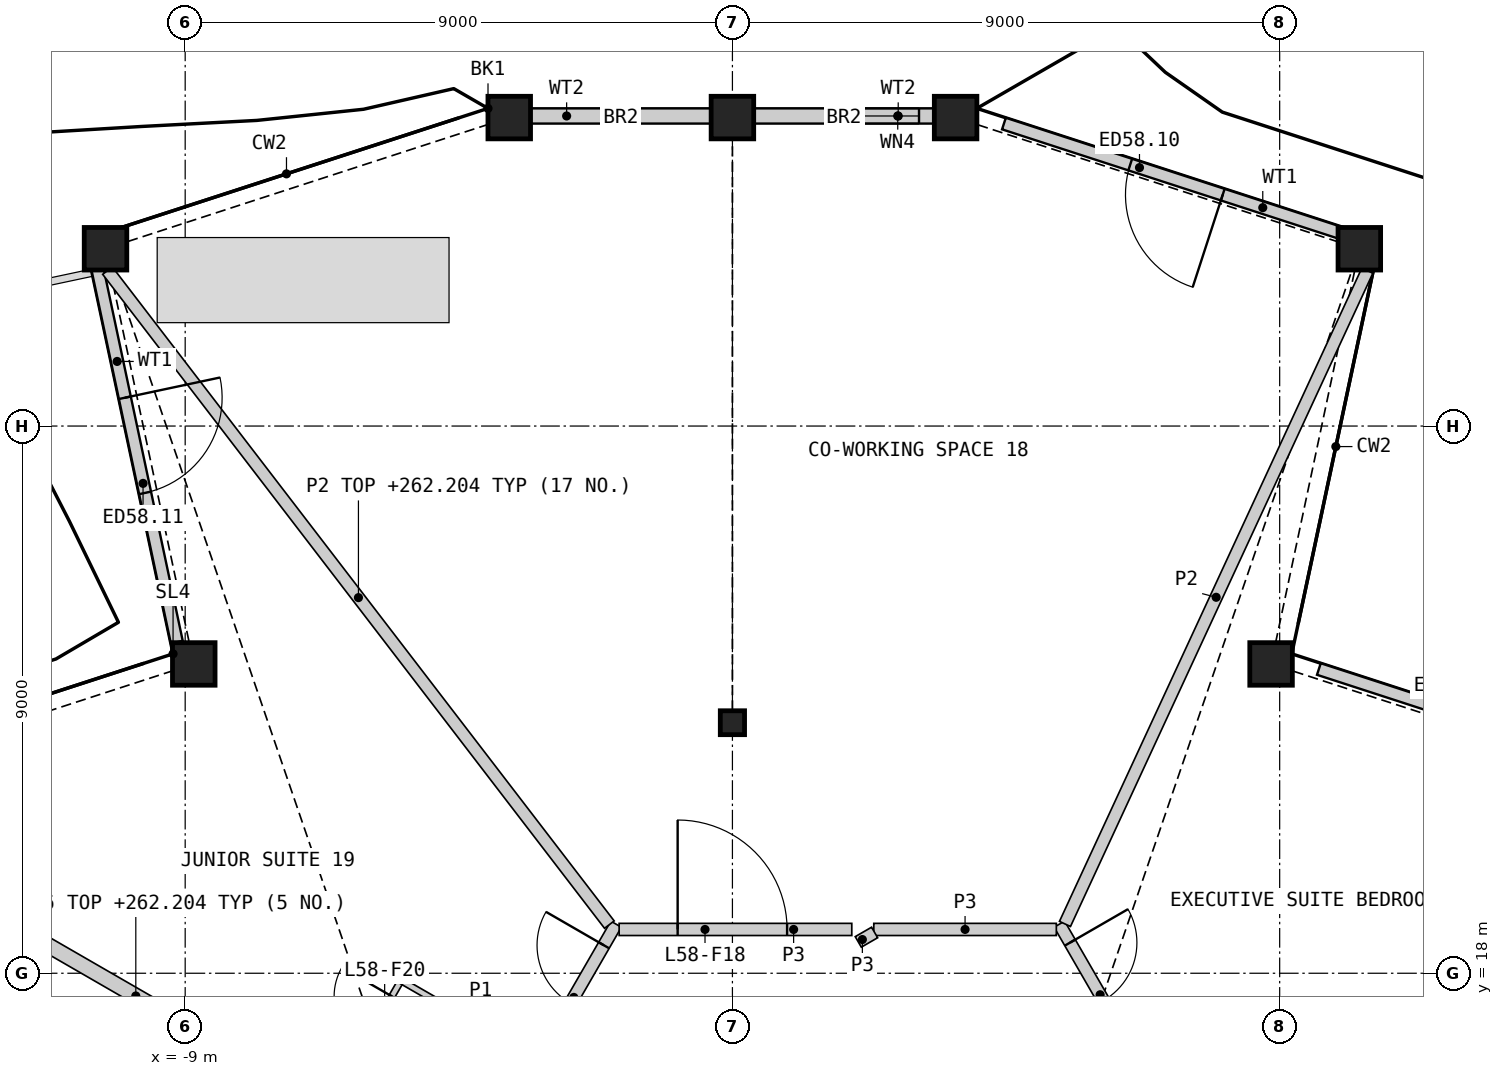
"""IFC4 building model, lengths in metres.
Left out: names, types, materials, properties, quantities, classifications, styles, units other than length and angle.
Written with IfcOpenShell. Run it as: python <this file> out.ifc"""

import sys

from ifc_helpers import new_model, si_unit, direction, frame, frame_2d, origin, origin_2d, place, context, subcontext, project, spatial, rectangle, hollow_rectangle, i_section, extrude, element, fill, save


model = new_model("IFC4")
c1 = context("Model", 3, precision=1e-05, world=origin(), true_north=direction((0.0, 1.0)))
c2 = subcontext(c1, "Body", "Model", "MODEL_VIEW")
j1 = project(units=[si_unit("LENGTHUNIT", "METRE"), si_unit("PLANEANGLEUNIT", "RADIAN")], contexts=[c1])
p1 = place(None, origin())
s1 = spatial("IfcSite", under=j1, at=p1, CompositionType="ELEMENT")
p2 = place(p1, origin())
s2 = spatial("IfcBuilding", under=s1, at=p2, CompositionType="ELEMENT")
p3 = place(p2, frame((0.0, 0.0, 259.8)))
s3 = spatial("IfcBuildingStorey", under=s2, at=p3, CompositionType="ELEMENT", Elevation=259.8)
for number, where, z_axis, x_axis in (
    (1, (8.859, 23.087, 0.0), (0.0, 0.0, 1.0), (1.0, 0.0, 0.0)),
    (2, (10.31, 29.916, 0.0), (0.0, 0.0, 1.0), (1.0, 0.0, 0.0)),
    (3, (3.67, 32.073, 0.0), (0.0, 0.0, 1.0), (1.0, 0.0, 0.0)),
    (4, (0.0, 32.073, 0.0), (0.0, 0.0, 1.0), (1.0, 0.0, 0.0)),
    (5, (-3.67, 32.073, 0.0), (0.0, 0.0, 1.0), (1.0, 0.0, 0.0)),
    (6, (-10.31, 29.916, 0.0), (0.0, 0.0, 1.0), (1.0, 0.0, 0.0)),
    (7, (-8.859, 23.087, 0.0), (0.0, 0.0, 1.0), (1.0, 0.0, 0.0)),
):
    element("IfcColumn", number, at=place(p3, frame(where, z_axis=z_axis, x_axis=x_axis)), inside=s3, PredefinedType="COLUMN", context=c2, shape_type="SweptSolid", body=[
        extrude(hollow_rectangle(XDim=0.7, YDim=0.7, WallThickness=0.045, at=origin_2d()), origin(), (0.0, 0.0, 1.0), 3.6),
    ])
p4 = place(p3, frame((0.0, 22.121, 0.0), z_axis=(0.0, 0.0, 1.0), x_axis=(1.0, 0.0, 0.0)))
e8 = element("IfcColumn", 8, at=p4, inside=s3, PredefinedType="COLUMN", context=c2, shape_type="SweptSolid", body=[
    extrude(i_section(OverallWidth=0.399, OverallDepth=0.393, WebThickness=0.023, FlangeThickness=0.037, at=origin_2d()), origin(), (0.0, 0.0, 1.0), 3.6),
])
p5 = place(p3, frame((15.321, 21.159, 0.0), z_axis=(0.0, 0.0, 1.0), x_axis=(-0.951053307318, 0.309026870418, 0.0)))
e9 = element("IfcWall", 9, at=p5, inside=s3, PredefinedType="SOLIDWALL", context=c2, shape_type="SweptSolid", body=[
    extrude(rectangle(XDim=5.968, YDim=0.2, at=frame_2d((2.984, 0.0))), origin(), (0.0, 0.0, 1.0), 2.701),
])
p6 = place(p5, frame((2.184, 0.0, 0.0)))
e10 = element("IfcOpeningElement", 10, at=p6, cuts=e9, PredefinedType="OPENING", context=c2, shape_type="SweptSolid", body=[
    extrude(rectangle(XDim=1.6, YDim=2.4, at=frame_2d((0.8, 1.2))), frame((0.0, 0.11, 0.0), z_axis=(0.0, -1.0, 0.0), x_axis=(1.0, 0.0, 0.0)), (0.0, 0.0, 1.0), 0.22),
])
p7 = place(p3, frame((10.141, 30.131, 0.0), z_axis=(0.0, 0.0, 1.0), x_axis=(-0.951049400374, 0.309038894069, 0.0)))
e11 = element("IfcWall", 11, at=p7, inside=s3, PredefinedType="SOLIDWALL", context=c2, shape_type="SweptSolid", body=[
    extrude(rectangle(XDim=5.968, YDim=0.2, at=frame_2d((2.984, 0.0))), origin(), (0.0, 0.0, 1.0), 2.701),
])
p8 = place(p7, frame((2.184, 0.0, 0.0)))
e12 = element("IfcOpeningElement", 12, at=p8, cuts=e11, PredefinedType="OPENING", context=c2, shape_type="SweptSolid", body=[
    extrude(rectangle(XDim=1.6, YDim=2.4, at=frame_2d((0.8, 1.2))), frame((0.0, 0.11, 0.0), z_axis=(0.0, -1.0, 0.0), x_axis=(1.0, 0.0, 0.0)), (0.0, 0.0, 1.0), 0.22),
])
p9 = place(p3, frame((3.519, 32.1, 0.0), z_axis=(0.0, 0.0, 1.0), x_axis=(-1.0, 0.0, 0.0)))
e13 = element("IfcWall", 13, at=p9, inside=s3, PredefinedType="SOLIDWALL", context=c2, shape_type="SweptSolid", body=[
    extrude(rectangle(XDim=3.169, YDim=0.25, at=frame_2d((1.584, 0.0))), origin(), (0.0, 0.0, 1.0), 2.701),
])
p10 = place(p9, frame((0.45, 0.0, 1.8)))
e14 = element("IfcOpeningElement", 14, at=p10, cuts=e13, PredefinedType="OPENING", context=c2, shape_type="SweptSolid", body=[
    extrude(rectangle(XDim=1.4, YDim=0.7, at=frame_2d((0.7, 0.35))), frame((0.0, 0.135, 0.0), z_axis=(0.0, -1.0, 0.0), x_axis=(1.0, 0.0, 0.0)), (0.0, 0.0, 1.0), 0.27),
])
p11 = place(p3, frame((-0.35, 32.1, 0.0), z_axis=(0.0, 0.0, 1.0), x_axis=(-1.0, 0.0, 0.0)))
e15 = element("IfcWall", 15, at=p11, inside=s3, PredefinedType="SOLIDWALL", context=c2, shape_type="SweptSolid", body=[
    extrude(rectangle(XDim=3.169, YDim=0.25, at=frame_2d((1.584, 0.0))), origin(), (0.0, 0.0, 1.0), 2.701),
])
p12 = place(p3, frame((-10.446, 29.602, 0.0), z_axis=(0.0, 0.0, 1.0), x_axis=(0.207926028339, -0.97814455309, 0.0)))
e16 = element("IfcWall", 16, at=p12, inside=s3, PredefinedType="SOLIDWALL", context=c2, shape_type="SweptSolid", body=[
    extrude(rectangle(XDim=6.293, YDim=0.2, at=frame_2d((3.147, 0.0))), origin(), (0.0, 0.0, 1.0), 2.701),
])
p13 = place(p12, frame((2.184, 0.0, 0.0)))
e17 = element("IfcOpeningElement", 17, at=p13, cuts=e16, PredefinedType="OPENING", context=c2, shape_type="SweptSolid", body=[
    extrude(rectangle(XDim=1.6, YDim=2.4, at=frame_2d((0.8, 1.2))), frame((0.0, 0.11, 0.0), z_axis=(0.0, -1.0, 0.0), x_axis=(1.0, 0.0, 0.0)), (0.0, 0.0, 1.0), 0.22),
])
p14 = place(p3, frame((5.377, 18.807, 0.0), z_axis=(0.0, 0.0, 1.0), x_axis=(0.499999852422, -0.866025488988, 0.0)))
e18 = element("IfcWall", 18, at=p14, inside=s3, PredefinedType="PARTITIONING", context=c2, shape_type="SweptSolid", body=[
    extrude(rectangle(XDim=27.198, YDim=0.2, at=frame_2d((13.599, 0.0))), origin(), (0.0, 0.0, 1.0), 3.25),
])
p15 = place(p14, frame((25.096, 0.0, 0.0)))
e19 = element("IfcOpeningElement", 19, at=p15, cuts=e18, PredefinedType="OPENING", context=c2, shape_type="SweptSolid", body=[
    extrude(rectangle(XDim=0.95, YDim=2.1, at=frame_2d((0.475, 1.05))), frame((0.0, 0.11, 0.0), z_axis=(0.0, -1.0, 0.0), x_axis=(1.0, 0.0, 0.0)), (0.0, 0.0, 1.0), 0.22),
])
p16 = place(p14, frame((19.122, 0.0, 0.0)))
e20 = element("IfcOpeningElement", 20, at=p16, cuts=e18, PredefinedType="OPENING", context=c2, shape_type="SweptSolid", body=[
    extrude(rectangle(XDim=1.0, YDim=2.1, at=frame_2d((0.5, 1.05))), frame((0.0, 0.11, 0.0), z_axis=(0.0, -1.0, 0.0), x_axis=(1.0, 0.0, 0.0)), (0.0, 0.0, 1.0), 0.22),
])
p17 = place(p14, frame((17.115, 0.0, 0.0)))
e21 = element("IfcOpeningElement", 21, at=p17, cuts=e18, PredefinedType="OPENING", context=c2, shape_type="SweptSolid", body=[
    extrude(rectangle(XDim=1.1, YDim=2.1, at=frame_2d((0.55, 1.05))), frame((0.0, 0.11, 0.0), z_axis=(0.0, -1.0, 0.0), x_axis=(1.0, 0.0, 0.0)), (0.0, 0.0, 1.0), 0.22),
])
p18 = place(p14, frame((0.35, 0.0, 0.0)))
e22 = element("IfcOpeningElement", 22, at=p18, cuts=e18, PredefinedType="OPENING", context=c2, shape_type="SweptSolid", body=[
    extrude(rectangle(XDim=1.1, YDim=2.1, at=frame_2d((0.55, 1.05))), frame((0.0, 0.11, 0.0), z_axis=(0.0, -1.0, 0.0), x_axis=(1.0, 0.0, 0.0)), (0.0, 0.0, 1.0), 0.22),
])
p19 = place(p3, frame((-15.138, 20.702, 0.0), z_axis=(0.0, 0.0, 1.0), x_axis=(0.86602627735, -0.499998486937, 0.0)))
e23 = element("IfcWall", 23, at=p19, inside=s3, PredefinedType="PARTITIONING", context=c2, shape_type="SweptSolid", body=[
    extrude(rectangle(XDim=12.301, YDim=0.25, at=frame_2d((6.15, 0.0))), origin(), (0.0, 0.0, 1.0), 2.404),
])
p20 = place(p3, frame((-4.668, 14.035, 0.0), z_axis=(0.0, 0.0, 1.0), x_axis=(0.499984524817, 0.866034338201, 0.0)))
e24 = element("IfcWall", 24, at=p20, inside=s3, PredefinedType="PARTITIONING", context=c2, shape_type="SweptSolid", body=[
    extrude(rectangle(XDim=5.51, YDim=0.2, at=frame_2d((2.755, 0.0))), origin(), (0.0, 0.0, 1.0), 3.25),
])
p21 = place(p20, frame((4.01, 0.0, 0.0)))
e25 = element("IfcOpeningElement", 25, at=p21, cuts=e24, PredefinedType="OPENING", context=c2, shape_type="SweptSolid", body=[
    extrude(rectangle(XDim=1.1, YDim=2.1, at=frame_2d((0.55, 1.05))), frame((0.0, 0.11, 0.0), z_axis=(0.0, -1.0, 0.0), x_axis=(1.0, 0.0, 0.0)), (0.0, 0.0, 1.0), 0.22),
])
p22 = place(p3, frame((-1.863, 18.72, 0.0), z_axis=(0.0, 0.0, 1.0), x_axis=(1.0, 0.0, 0.0)))
e26 = element("IfcWall", 26, at=p22, inside=s3, PredefinedType="PARTITIONING", context=c2, shape_type="SweptSolid", body=[
    extrude(rectangle(XDim=3.826, YDim=0.2, at=frame_2d((1.913, 0.0))), origin(), (0.0, 0.0, 1.0), 3.25),
])
p23 = place(p22, frame((0.962, 0.0, 0.0)))
e27 = element("IfcOpeningElement", 27, at=p23, cuts=e26, PredefinedType="OPENING", context=c2, shape_type="SweptSolid", body=[
    extrude(rectangle(XDim=1.8, YDim=2.1, at=frame_2d((0.9, 1.05))), frame((0.0, 0.11, 0.0), z_axis=(0.0, -1.0, 0.0), x_axis=(1.0, 0.0, 0.0)), (0.0, 0.0, 1.0), 0.22),
])
p24 = place(p3, frame((2.325, 18.72, 0.0), z_axis=(0.0, 0.0, 1.0), x_axis=(1.0, 0.0, 0.0)))
e28 = element("IfcWall", 28, at=p24, inside=s3, PredefinedType="PARTITIONING", context=c2, shape_type="SweptSolid", body=[
    extrude(rectangle(XDim=3.002, YDim=0.2, at=frame_2d((1.501, 0.0))), origin(), (0.0, 0.0, 1.0), 3.25),
])
p25 = place(p3, frame((2.07, 18.515, 0.0), z_axis=(0.0, 0.0, 1.0), x_axis=(0.866054481515, 0.499949632511, 0.0)))
e29 = element("IfcWall", 29, at=p25, inside=s3, PredefinedType="PARTITIONING", context=c2, shape_type="SweptSolid", body=[
    extrude(rectangle(XDim=0.31, YDim=0.2, at=frame_2d((0.155, 0.0))), origin(), (0.0, 0.0, 1.0), 3.25),
])
p26 = place(p3, frame((-10.277, 29.556, 0.0), z_axis=(0.0, 0.0, 1.0), x_axis=(0.60876001101, -0.793354428358, 0.0)))
e30 = element("IfcWall", 30, at=p26, inside=s3, PredefinedType="PARTITIONING", context=c2, shape_type="SweptSolid", body=[
    extrude(rectangle(XDim=13.558, YDim=0.2, at=frame_2d((6.779, 0.0))), origin(), (0.0, 0.0, 1.0), 2.404),
])
p27 = place(p3, frame((5.469, 18.811, 0.0), z_axis=(0.0, 0.0, 1.0), x_axis=(0.419996836618, 0.907525568362, 0.0)))
e31 = element("IfcWall", 31, at=p27, inside=s3, PredefinedType="PARTITIONING", context=c2, shape_type="SweptSolid", body=[
    extrude(rectangle(XDim=11.84, YDim=0.2, at=frame_2d((5.92, 0.0))), origin(), (0.0, 0.0, 1.0), 2.404),
])
p28 = place(p3, frame((-5.494, 17.905, 0.0), z_axis=(0.0, 0.0, 1.0), x_axis=(0.866030925526, -0.499990435942, 0.0)))
e32 = element("IfcWall", 32, at=p28, inside=s3, PredefinedType="PARTITIONING", context=c2, shape_type="SweptSolid", body=[
    extrude(rectangle(XDim=2.55, YDim=0.1, at=frame_2d((1.275, 0.0))), origin(), (0.0, 0.0, 1.0), 2.404),
])
p29 = place(p3, frame((-6.588, 15.909, 0.0), z_axis=(0.0, 0.0, 1.0), x_axis=(0.49999788721, 0.866026623601, 0.0)))
e33 = element("IfcWall", 33, at=p29, inside=s3, PredefinedType="PARTITIONING", context=c2, shape_type="SweptSolid", body=[
    extrude(rectangle(XDim=2.225, YDim=0.1, at=frame_2d((1.113, 0.0))), origin(), (0.0, 0.0, 1.0), 2.404),
])
p30 = place(p29, frame((1.025, 0.0, 0.0)))
e34 = element("IfcOpeningElement", 34, at=p30, cuts=e33, PredefinedType="OPENING", context=c2, shape_type="SweptSolid", body=[
    extrude(rectangle(XDim=0.95, YDim=2.1, at=frame_2d((0.475, 1.05))), frame((0.0, 0.06, 0.0), z_axis=(0.0, -1.0, 0.0), x_axis=(1.0, 0.0, 0.0)), (0.0, 0.0, 1.0), 0.12),
])
p31 = place(p8, origin())
e35 = element("IfcDoor", 35, at=p31, inside=s3, OperationType="DOUBLE_DOOR_SINGLE_SWING", PredefinedType="DOOR", context=c2, shape_type="SweptSolid", body=[
    extrude(rectangle(XDim=1.6, YDim=2.4, at=frame_2d((0.8, 1.2))), frame((0.0, 0.025, 0.0), z_axis=(0.0, -1.0, 0.0), x_axis=(1.0, 0.0, 0.0)), (0.0, 0.0, 1.0), 0.05),
])
fill(e12, e35)
p32 = place(p10, origin())
e36 = element("IfcWindow", 36, at=p32, inside=s3, PartitioningType="SINGLE_PANEL", PredefinedType="WINDOW", context=c2, shape_type="SweptSolid", body=[
    extrude(rectangle(XDim=1.4, YDim=0.7, at=frame_2d((0.7, 0.35))), frame((0.0, 0.03, 0.0), z_axis=(0.0, -1.0, 0.0), x_axis=(1.0, 0.0, 0.0)), (0.0, 0.0, 1.0), 0.06),
])
fill(e14, e36)
p33 = place(p13, origin())
e37 = element("IfcDoor", 37, at=p33, inside=s3, OperationType="DOUBLE_DOOR_SINGLE_SWING", PredefinedType="DOOR", context=c2, shape_type="SweptSolid", body=[
    extrude(rectangle(XDim=1.6, YDim=2.4, at=frame_2d((0.8, 1.2))), frame((0.0, 0.025, 0.0), z_axis=(0.0, -1.0, 0.0), x_axis=(1.0, 0.0, 0.0)), (0.0, 0.0, 1.0), 0.05),
])
fill(e17, e37)
p34 = place(p18, origin())
e38 = element("IfcDoor", 38, at=p34, inside=s3, OperationType="SINGLE_SWING_LEFT", PredefinedType="DOOR", context=c2, shape_type="SweptSolid", body=[
    extrude(rectangle(XDim=1.1, YDim=2.1, at=frame_2d((0.55, 1.05))), frame((0.0, 0.025, 0.0), z_axis=(0.0, -1.0, 0.0), x_axis=(1.0, 0.0, 0.0)), (0.0, 0.0, 1.0), 0.05),
])
fill(e22, e38)
p35 = place(p23, origin())
e39 = element("IfcDoor", 39, at=p35, inside=s3, OperationType="DOUBLE_DOOR_SINGLE_SWING", PredefinedType="DOOR", context=c2, shape_type="SweptSolid", body=[
    extrude(rectangle(XDim=1.8, YDim=2.1, at=frame_2d((0.9, 1.05))), frame((0.0, 0.025, 0.0), z_axis=(0.0, -1.0, 0.0), x_axis=(1.0, 0.0, 0.0)), (0.0, 0.0, 1.0), 0.05),
])
fill(e27, e39)
p36 = place(p21, origin())
e40 = element("IfcDoor", 40, at=p36, inside=s3, OperationType="SINGLE_SWING_RIGHT", PredefinedType="DOOR", context=c2, shape_type="SweptSolid", body=[
    extrude(rectangle(XDim=1.1, YDim=2.1, at=frame_2d((0.55, 1.05))), frame((0.0, 0.025, 0.0), z_axis=(0.0, -1.0, 0.0), x_axis=(1.0, 0.0, 0.0)), (0.0, 0.0, 1.0), 0.05),
])
fill(e25, e40)
p37 = place(p30, origin())
e41 = element("IfcDoor", 41, at=p37, inside=s3, OperationType="SINGLE_SWING_RIGHT", PredefinedType="DOOR", context=c2, shape_type="SweptSolid", body=[
    extrude(rectangle(XDim=0.95, YDim=2.1, at=frame_2d((0.475, 1.05))), frame((0.0, 0.025, 0.0), z_axis=(0.0, -1.0, 0.0), x_axis=(1.0, 0.0, 0.0)), (0.0, 0.0, 1.0), 0.05),
])
fill(e34, e41)
save(model, sys.argv[1])
